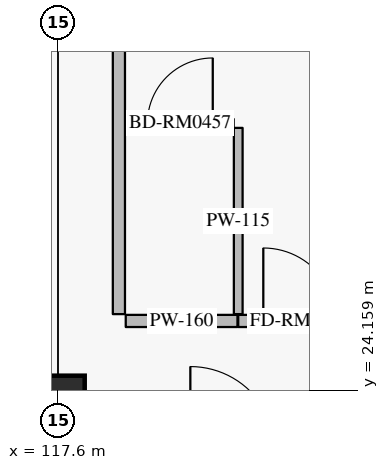
"""IFC4 building model, lengths in metres.
Left out: names, types, materials, properties, quantities, classifications, styles, units other than length and angle.
Written with IfcOpenShell. Run it as: python <this file> out.ifc"""

import sys

from ifc_helpers import new_model, si_unit, direction, frame, frame_2d, origin, origin_2d, place, context, subcontext, project, spatial, rectangle, extrude, element, fill, save


model = new_model("IFC4")
c1 = context("Model", 3, precision=1e-05, world=origin(), true_north=direction((0.0, 1.0)))
c2 = subcontext(c1, "Body", "Model", "MODEL_VIEW")
j1 = project(units=[si_unit("LENGTHUNIT", "METRE"), si_unit("PLANEANGLEUNIT", "RADIAN")], contexts=[c1])
p1 = place(None, origin())
s1 = spatial("IfcSite", under=j1, at=p1, CompositionType="ELEMENT")
p2 = place(p1, origin())
s2 = spatial("IfcBuilding", under=s1, at=p2, CompositionType="ELEMENT")
p3 = place(p2, frame((0.0, 0.0, 16.2)))
s3 = spatial("IfcBuildingStorey", under=s2, at=p3, CompositionType="ELEMENT", Elevation=16.2)
p4 = place(p3, frame((117.6, 24.0, 0.0), z_axis=(0.0, 0.0, 1.0), x_axis=(1.0, 0.0, 0.0)))
e1 = element("IfcColumn", 1, at=p4, inside=s3, PredefinedType="COLUMN", context=c2, shape_type="SweptSolid", body=[
    extrude(rectangle(XDim=0.7, YDim=0.7, at=origin_2d()), origin(), (0.0, 0.0, 1.0), 4.8),
])
p5 = place(p3, frame((118.49, 25.07, 0.0), z_axis=(0.0, 0.0, 1.0), x_axis=(1.0, 0.0, 0.0)))
e2 = element("IfcWall", 2, at=p5, inside=s3, PredefinedType="PARTITIONING", context=c2, shape_type="SweptSolid", body=[
    extrude(rectangle(XDim=1.47, YDim=0.16, at=frame_2d((0.735, 0.0))), origin(), (0.0, 0.0, 1.0), 4.535),
])
p6 = place(p3, frame((119.97, 25.07, 0.0), z_axis=(0.0, 0.0, 1.0), x_axis=(1.0, 0.0, 0.0)))
e3 = element("IfcWall", 3, at=p6, inside=s3, PredefinedType="PARTITIONING", context=c2, shape_type="SweptSolid", body=[
    extrude(rectangle(XDim=1.62, YDim=0.16, at=frame_2d((0.81, 0.0))), origin(), (0.0, 0.0, 1.0), 4.535),
])
p7 = place(p6, frame((0.33, 0.0, 0.0)))
e4 = element("IfcOpeningElement", 4, at=p7, cuts=e3, PredefinedType="OPENING", context=c2, shape_type="SweptSolid", body=[
    extrude(rectangle(XDim=0.96, YDim=2.2, at=frame_2d((0.48, 1.1))), frame((0.0, 0.09, 0.0), z_axis=(0.0, -1.0, 0.0), x_axis=(1.0, 0.0, 0.0)), (0.0, 0.0, 1.0), 0.18),
])
p8 = place(p3, frame((119.97, 25.16, 0.0), z_axis=(0.0, 0.0, 1.0), x_axis=(0.0, 1.0, 0.0)))
e5 = element("IfcWall", 5, at=p8, inside=s3, PredefinedType="PARTITIONING", context=c2, shape_type="SweptSolid", body=[
    extrude(rectangle(XDim=2.45, YDim=0.115, at=frame_2d((1.225, 0.0))), origin(), (0.0, 0.0, 1.0), 4.535),
])
p9 = place(p3, frame((118.5, 27.67, 0.0), z_axis=(0.0, 0.0, 1.0), x_axis=(1.0, 0.0, 0.0)))
e6 = element("IfcWall", 6, at=p9, inside=s3, PredefinedType="PARTITIONING", context=c2, shape_type="SweptSolid", body=[
    extrude(rectangle(XDim=1.41, YDim=0.115, at=frame_2d((0.705, 0.0))), origin(), (0.0, 0.0, 1.0), 4.535),
])
p10 = place(p9, frame((0.275, 0.0, 0.0)))
e7 = element("IfcOpeningElement", 7, at=p10, cuts=e6, PredefinedType="OPENING", context=c2, shape_type="SweptSolid", body=[
    extrude(rectangle(XDim=0.86, YDim=2.12, at=frame_2d((0.43, 1.06))), frame((0.0, 0.067, 0.0), z_axis=(0.0, -1.0, 0.0), x_axis=(1.0, 0.0, 0.0)), (0.0, 0.0, 1.0), 0.135),
])
p11 = place(p3, frame((118.4, 25.16, 0.0), z_axis=(0.0, 0.0, 1.0), x_axis=(0.0, 1.0, 0.0)))
e8 = element("IfcWall", 8, at=p11, inside=s3, PredefinedType="PARTITIONING", context=c2, shape_type="SweptSolid", body=[
    extrude(rectangle(XDim=6.5, YDim=0.16, at=frame_2d((3.25, 0.0))), origin(), (0.0, 0.0, 1.0), 4.535),
])
p12 = place(p7, origin())
e9 = element("IfcDoor", 9, at=p12, inside=s3, OperationType="SINGLE_SWING_LEFT", PredefinedType="DOOR", context=c2, shape_type="SweptSolid", body=[
    extrude(rectangle(XDim=0.96, YDim=2.2, at=frame_2d((0.48, 1.1))), frame((0.0, 0.025, 0.0), z_axis=(0.0, -1.0, 0.0), x_axis=(1.0, 0.0, 0.0)), (0.0, 0.0, 1.0), 0.05),
])
fill(e4, e9)
p13 = place(p10, origin())
e10 = element("IfcDoor", 10, at=p13, inside=s3, OperationType="SINGLE_SWING_RIGHT", PredefinedType="DOOR", context=c2, shape_type="SweptSolid", body=[
    extrude(rectangle(XDim=0.86, YDim=2.12, at=frame_2d((0.43, 1.06))), frame((0.0, 0.025, 0.0), z_axis=(0.0, -1.0, 0.0), x_axis=(1.0, 0.0, 0.0)), (0.0, 0.0, 1.0), 0.05),
])
fill(e7, e10)
save(model, sys.argv[1])
